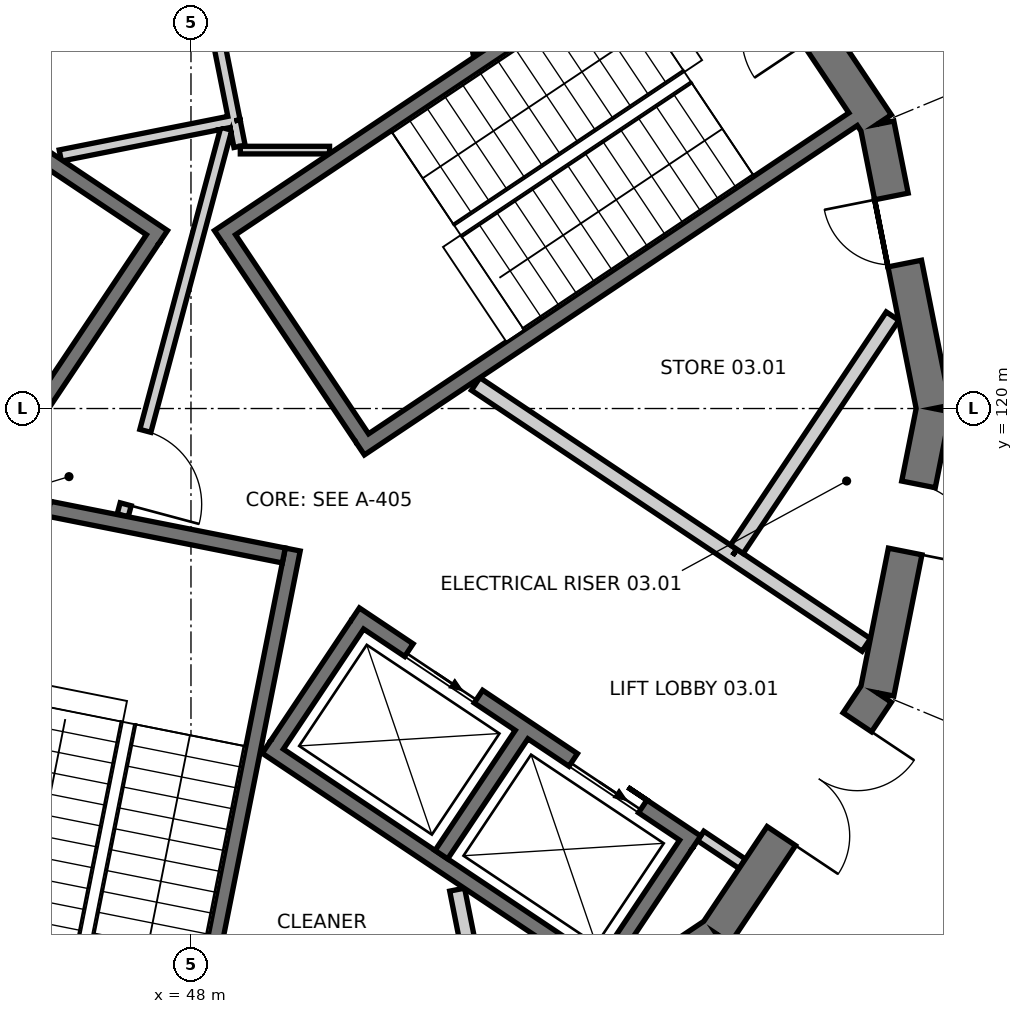
"""IFC4 building model, lengths in metres.
Left out: names, types, materials, properties, quantities, classifications, styles, units other than length and angle.
Written with IfcOpenShell. Run it as: python <this file> out.ifc"""

import sys

from ifc_helpers import new_model, si_unit, direction, frame, frame_2d, origin, place, context, subcontext, project, spatial, polyline, rectangle, outline, extrude, element, fill, save


model = new_model("IFC4")
c1 = context("Model", 3, precision=1e-05, world=origin(), true_north=direction((0.0, 1.0)))
c2 = subcontext(c1, "Body", "Model", "MODEL_VIEW")
j1 = project(units=[si_unit("LENGTHUNIT", "METRE"), si_unit("PLANEANGLEUNIT", "RADIAN")], contexts=[c1])
p1 = place(None, origin())
s1 = spatial("IfcSite", under=j1, at=p1, CompositionType="ELEMENT")
p2 = place(p1, origin())
s2 = spatial("IfcBuilding", under=s1, at=p2, CompositionType="ELEMENT")
p3 = place(p2, frame((0.0, 0.0, 15.6)))
s3 = spatial("IfcBuildingStorey", under=s2, at=p3, CompositionType="ELEMENT", Elevation=15.6)
p4 = place(p3, frame((57.771, 120.0, 0.0), z_axis=(0.0, 0.0, 1.0), x_axis=(-0.195069197673, 0.98078948206, 0.0)))
e1 = element("IfcWall", 1, at=p4, inside=s3, PredefinedType="SHEAR", context=c2, shape_type="SweptSolid", body=[
    extrude(outline(polyline([(-0.045, -0.225), (3.857, -0.225), (3.768, 0.225), (0.045, 0.225), (-0.045, -0.225)])), origin(), (0.0, 0.0, 1.0), 4.8),
])
p5 = place(p4, frame((1.945, 0.0, 0.0)))
e2 = element("IfcOpeningElement", 2, at=p5, cuts=e1, PredefinedType="OPENING", context=c2, shape_type="SweptSolid", body=[
    extrude(rectangle(XDim=0.9, YDim=2.1, at=frame_2d((0.45, 1.05))), frame((0.0, 0.235, 0.0), z_axis=(0.0, -1.0, 0.0), x_axis=(1.0, 0.0, 0.0)), (0.0, 0.0, 1.0), 0.47),
])
p6 = place(p3, frame((57.027, 123.739, 0.0), z_axis=(0.0, 0.0, 1.0), x_axis=(-0.555542277102, 0.83148829117, 0.0)))
e3 = element("IfcWall", 3, at=p6, inside=s3, PredefinedType="SHEAR", context=c2, shape_type="SweptSolid", body=[
    extrude(outline(polyline([(-0.045, -0.225), (3.857, -0.225), (3.768, 0.225), (0.045, 0.225), (-0.045, -0.225)])), origin(), (0.0, 0.0, 1.0), 4.8),
])
p7 = place(p6, frame((1.406, 0.0, 0.0)))
e4 = element("IfcOpeningElement", 4, at=p7, cuts=e3, PredefinedType="OPENING", context=c2, shape_type="SweptSolid", body=[
    extrude(rectangle(XDim=1.0, YDim=2.1, at=frame_2d((0.5, 1.05))), frame((0.0, 0.235, 0.0), z_axis=(0.0, -1.0, 0.0), x_axis=(1.0, 0.0, 0.0)), (0.0, 0.0, 1.0), 0.47),
])
p8 = place(p3, frame((51.739, 110.973, 0.0), z_axis=(0.0, 0.0, 1.0), x_axis=(0.83148829117, 0.555542277102, 0.0)))
e5 = element("IfcWall", 5, at=p8, inside=s3, PredefinedType="SHEAR", context=c2, shape_type="SweptSolid", body=[
    extrude(outline(polyline([(-0.045, -0.225), (3.857, -0.225), (3.768, 0.225), (0.045, 0.225), (-0.045, -0.225)])), origin(), (0.0, 0.0, 1.0), 4.8),
])
p9 = place(p3, frame((54.909, 113.091, 0.0), z_axis=(0.0, 0.0, 1.0), x_axis=(0.555542277102, 0.83148829117, 0.0)))
e6 = element("IfcWall", 6, at=p9, inside=s3, PredefinedType="SHEAR", context=c2, shape_type="SweptSolid", body=[
    extrude(outline(polyline([(-0.045, -0.225), (3.857, -0.225), (3.768, 0.225), (0.045, 0.225), (-0.045, -0.225)])), origin(), (0.0, 0.0, 1.0), 4.8),
])
p10 = place(p9, frame((1.545, 0.0, 0.0)))
e7 = element("IfcOpeningElement", 7, at=p10, cuts=e6, PredefinedType="OPENING", context=c2, shape_type="SweptSolid", body=[
    extrude(rectangle(XDim=1.8, YDim=2.1, at=frame_2d((0.9, 1.05))), frame((0.0, 0.235, 0.0), z_axis=(0.0, -1.0, 0.0), x_axis=(1.0, 0.0, 0.0)), (0.0, 0.0, 1.0), 0.47),
])
p11 = place(p3, frame((57.027, 116.261, 0.0), z_axis=(0.0, 0.0, 1.0), x_axis=(0.195069197673, 0.98078948206, 0.0)))
e8 = element("IfcWall", 8, at=p11, inside=s3, PredefinedType="SHEAR", context=c2, shape_type="SweptSolid", body=[
    extrude(outline(polyline([(-0.045, -0.225), (3.857, -0.225), (3.768, 0.225), (0.045, 0.225), (-0.045, -0.225)])), origin(), (0.0, 0.0, 1.0), 4.8),
])
p12 = place(p11, frame((1.895, 0.0, 0.0)))
e9 = element("IfcOpeningElement", 9, at=p12, cuts=e8, PredefinedType="OPENING", context=c2, shape_type="SweptSolid", body=[
    extrude(rectangle(XDim=0.9, YDim=2.1, at=frame_2d((0.45, 1.05))), frame((0.0, 0.235, 0.0), z_axis=(0.0, -1.0, 0.0), x_axis=(1.0, 0.0, 0.0)), (0.0, 0.0, 1.0), 0.47),
])
p13 = place(p3, frame((48.365, 122.258, 0.0), z_axis=(0.0, 0.0, 1.0), x_axis=(0.831476803301, 0.555559470779, 0.0)))
e10 = element("IfcWall", 10, at=p13, inside=s3, PredefinedType="SHEAR", context=c2, shape_type="SweptSolid", body=[
    extrude(rectangle(XDim=7.8, YDim=0.2, at=frame_2d((3.9, 0.0))), origin(), (0.0, 0.0, 1.0), 4.8),
])
p14 = place(p3, frame((50.226, 119.473, 0.0), z_axis=(0.0, 0.0, 1.0), x_axis=(0.831486463828, 0.555545012102, 0.0)))
e11 = element("IfcWall", 11, at=p14, inside=s3, PredefinedType="SHEAR", context=c2, shape_type="SweptSolid", body=[
    extrude(rectangle(XDim=7.8, YDim=0.2, at=frame_2d((3.9, 0.0))), origin(), (0.0, 0.0, 1.0), 4.8),
])
p15 = place(p3, frame((50.253, 119.612, 0.0), z_axis=(0.0, 0.0, 1.0), x_axis=(-0.55555842186, 0.831477504146, 0.0)))
e12 = element("IfcWall", 12, at=p15, inside=s3, PredefinedType="SHEAR", context=c2, shape_type="SweptSolid", body=[
    extrude(rectangle(XDim=3.15, YDim=0.2, at=frame_2d((1.575, 0.0))), origin(), (0.0, 0.0, 1.0), 4.8),
])
p16 = place(p3, frame((47.635, 122.258, 0.0), z_axis=(0.0, 0.0, 1.0), x_axis=(-0.831476803301, 0.555559470779, 0.0)))
e13 = element("IfcWall", 13, at=p16, inside=s3, PredefinedType="SHEAR", context=c2, shape_type="SweptSolid", body=[
    extrude(rectangle(XDim=7.8, YDim=0.2, at=frame_2d((3.9, 0.0))), origin(), (0.0, 0.0, 1.0), 4.8),
])
p17 = place(p3, frame((47.497, 122.231, 0.0), z_axis=(0.0, 0.0, 1.0), x_axis=(-0.55555842186, -0.831477504146, 0.0)))
e14 = element("IfcWall", 14, at=p17, inside=s3, PredefinedType="SHEAR", context=c2, shape_type="SweptSolid", body=[
    extrude(rectangle(XDim=3.15, YDim=0.2, at=frame_2d((1.575, 0.0))), origin(), (0.0, 0.0, 1.0), 4.8),
])
p18 = place(p3, frame((49.339, 118.145, 0.0), z_axis=(0.0, 0.0, 1.0), x_axis=(-0.195092759861, -0.980784795483, 0.0)))
e15 = element("IfcWall", 15, at=p18, inside=s3, PredefinedType="SHEAR", context=c2, shape_type="SweptSolid", body=[
    extrude(rectangle(XDim=7.8, YDim=0.2, at=frame_2d((3.9, 0.0))), origin(), (0.0, 0.0, 1.0), 4.8),
])
p19 = place(p3, frame((46.132, 118.681, 0.0), z_axis=(0.0, 0.0, 1.0), x_axis=(0.980785830564, -0.195087556151, 0.0)))
e16 = element("IfcWall", 16, at=p19, inside=s3, PredefinedType="SHEAR", context=c2, shape_type="SweptSolid", body=[
    extrude(rectangle(XDim=3.15, YDim=0.2, at=frame_2d((1.575, 0.0))), origin(), (0.0, 0.0, 1.0), 4.8),
])
p20 = place(p3, frame((50.16, 117.293, 0.0), z_axis=(0.0, 0.0, 1.0), x_axis=(0.831479497601, -0.55555543834, 0.0)))
e17 = element("IfcWall", 17, at=p20, inside=s3, PredefinedType="SHEAR", context=c2, shape_type="SweptSolid", body=[
    extrude(rectangle(XDim=5.4, YDim=0.2, at=frame_2d((2.7, 0.0))), origin(), (0.0, 0.0, 1.0), 4.8),
])
p21 = place(p20, frame((0.85, 0.0, 0.0)))
e18 = element("IfcOpeningElement", 18, at=p21, cuts=e17, PredefinedType="OPENING", context=c2, shape_type="SweptSolid", body=[
    extrude(rectangle(XDim=1.1, YDim=2.1, at=frame_2d((0.55, 1.05))), frame((0.0, 0.11, 0.0), z_axis=(0.0, -1.0, 0.0), x_axis=(1.0, 0.0, 0.0)), (0.0, 0.0, 1.0), 0.22),
])
p22 = place(p20, frame((3.45, 0.0, 0.0)))
e19 = element("IfcOpeningElement", 19, at=p22, cuts=e17, PredefinedType="OPENING", context=c2, shape_type="SweptSolid", body=[
    extrude(rectangle(XDim=1.1, YDim=2.1, at=frame_2d((0.55, 1.05))), frame((0.0, 0.11, 0.0), z_axis=(0.0, -1.0, 0.0), x_axis=(1.0, 0.0, 0.0)), (0.0, 0.0, 1.0), 0.22),
])
p23 = place(p3, frame((48.994, 115.548, 0.0), z_axis=(0.0, 0.0, 1.0), x_axis=(0.831444656906, -0.555607579593, 0.0)))
e20 = element("IfcWall", 20, at=p23, inside=s3, PredefinedType="SHEAR", context=c2, shape_type="SweptSolid", body=[
    extrude(rectangle(XDim=5.4, YDim=0.2, at=frame_2d((2.7, 0.0))), origin(), (0.0, 0.0, 1.0), 4.8),
])
p24 = place(p3, frame((50.188, 117.155, 0.0), z_axis=(0.0, 0.0, 1.0), x_axis=(-0.555559945722, -0.831476485963, 0.0)))
e21 = element("IfcWall", 21, at=p24, inside=s3, PredefinedType="SHEAR", context=c2, shape_type="SweptSolid", body=[
    extrude(rectangle(XDim=1.9, YDim=0.2, at=frame_2d((0.95, 0.0))), origin(), (0.0, 0.0, 1.0), 4.8),
])
p25 = place(p3, frame((52.35, 115.71, 0.0), z_axis=(0.0, 0.0, 1.0), x_axis=(-0.55550058618, -0.831516144614, 0.0)))
e22 = element("IfcWall", 22, at=p25, inside=s3, PredefinedType="SHEAR", context=c2, shape_type="SweptSolid", body=[
    extrude(rectangle(XDim=1.9, YDim=0.2, at=frame_2d((0.95, 0.0))), origin(), (0.0, 0.0, 1.0), 4.8),
])
p26 = place(p3, frame((54.512, 114.266, 0.0), z_axis=(0.0, 0.0, 1.0), x_axis=(-0.555589423235, -0.83145678949, 0.0)))
e23 = element("IfcWall", 23, at=p26, inside=s3, PredefinedType="SHEAR", context=c2, shape_type="SweptSolid", body=[
    extrude(rectangle(XDim=1.9, YDim=0.2, at=frame_2d((0.95, 0.0))), origin(), (0.0, 0.0, 1.0), 4.8),
])
p27 = place(p3, frame((55.126, 118.065, 0.0), z_axis=(0.0, 0.0, 1.0), x_axis=(-0.831495502265, 0.555531483998, 0.0)))
e24 = element("IfcWall", 24, at=p27, inside=s3, PredefinedType="SOLIDWALL", context=c2, shape_type="SweptSolid", body=[
    extrude(rectangle(XDim=4.065, YDim=0.2, at=frame_2d((2.033, 0.0))), origin(), (0.0, 0.0, 1.0), 4.52),
])
p28 = place(p3, frame((57.231, 121.215, 0.0), z_axis=(0.0, 0.0, 1.0), x_axis=(-0.555600969312, -0.831449074147, 0.0)))
e25 = element("IfcWall", 25, at=p28, inside=s3, PredefinedType="SOLIDWALL", context=c2, shape_type="SweptSolid", body=[
    extrude(rectangle(XDim=3.689, YDim=0.2, at=frame_2d((1.844, 0.0))), origin(), (0.0, 0.0, 1.0), 4.52),
])
p29 = place(p3, frame((56.885, 116.89, 0.0), z_axis=(0.0, 0.0, 1.0), x_axis=(-0.831446094913, 0.555605427667, 0.0)))
e26 = element("IfcWall", 26, at=p29, inside=s3, PredefinedType="SOLIDWALL", context=c2, shape_type="SweptSolid", body=[
    extrude(rectangle(XDim=2.115, YDim=0.2, at=frame_2d((1.058, 0.0))), origin(), (0.0, 0.0, 1.0), 4.52),
])
p30 = place(p3, frame((48.056, 126.384, 0.0), z_axis=(0.0, 0.0, 1.0), x_axis=(0.195123903338, -0.980778600065, 0.0)))
e27 = element("IfcWall", 27, at=p30, inside=s3, PredefinedType="PARTITIONING", context=c2, shape_type="SweptSolid", body=[
    extrude(rectangle(XDim=2.65, YDim=0.15, at=frame_2d((1.325, 0.0))), origin(), (0.0, 0.0, 1.0), 4.52),
])
p31 = place(p3, frame((48.524, 123.775, 0.0), z_axis=(0.0, 0.0, 1.0), x_axis=(-0.980777249161, -0.195130693455, 0.0)))
e28 = element("IfcWall", 28, at=p31, inside=s3, PredefinedType="PARTITIONING", context=c2, shape_type="SweptSolid", body=[
    extrude(rectangle(XDim=2.287, YDim=0.15, at=frame_2d((1.144, 0.0))), origin(), (0.0, 0.0, 1.0), 4.52),
])
p32 = place(p3, frame((50.911, 128.943, 0.0), z_axis=(0.0, 0.0, 1.0), x_axis=(0.195113868301, -0.980780596462, 0.0)))
e29 = element("IfcWall", 29, at=p32, inside=s3, PredefinedType="PARTITIONING", context=c2, shape_type="SweptSolid", body=[
    extrude(rectangle(XDim=4.357, YDim=0.1, at=frame_2d((2.178, 0.0))), origin(), (0.0, 0.0, 1.0), 4.52),
])
p33 = place(p3, frame((49.823, 123.4, 0.0), z_axis=(0.0, 0.0, 1.0), x_axis=(-1.0, 0.0, 0.0)))
e30 = element("IfcWall", 30, at=p33, inside=s3, PredefinedType="PARTITIONING", context=c2, shape_type="SweptSolid", body=[
    extrude(rectangle(XDim=1.174, YDim=0.1, at=frame_2d((0.587, 0.0))), origin(), (0.0, 0.0, 1.0), 4.52),
])
p34 = place(p3, frame((48.639, 123.449, 0.0), z_axis=(0.0, 0.0, 1.0), x_axis=(-0.194880473507, 0.98082699853, 0.0)))
e31 = element("IfcWall", 31, at=p34, inside=s3, PredefinedType="PARTITIONING", context=c2, shape_type="SweptSolid", body=[
    extrude(rectangle(XDim=0.342, YDim=0.15, at=frame_2d((0.171, 0.0))), origin(), (0.0, 0.0, 1.0), 4.52),
])
p35 = place(p3, frame((51.502, 113.67, 0.0), z_axis=(0.0, 0.0, 1.0), x_axis=(0.19508928515, -0.980785486648, 0.0)))
e32 = element("IfcWall", 32, at=p35, inside=s3, PredefinedType="SOLIDWALL", context=c2, shape_type="SweptSolid", body=[
    extrude(rectangle(XDim=2.286, YDim=0.2, at=frame_2d((1.143, 0.0))), origin(), (0.0, 0.0, 1.0), 4.52),
])
p36 = place(p3, frame((54.706, 114.377, 0.0), z_axis=(0.0, 0.0, 1.0), x_axis=(0.831421626399, -0.555642042286, 0.0)))
e33 = element("IfcWall", 33, at=p36, inside=s3, PredefinedType="PARTITIONING", context=c2, shape_type="SweptSolid", body=[
    extrude(rectangle(XDim=0.658, YDim=0.15, at=frame_2d((0.329, 0.0))), origin(), (0.0, 0.0, 1.0), 4.52),
])
p37 = place(p3, frame((47.102, 118.595, 0.0), z_axis=(0.0, 0.0, 1.0), x_axis=(0.258814124304, 0.9659271448, 0.0)))
e34 = element("IfcWall", 34, at=p37, inside=s3, PredefinedType="PARTITIONING", context=c2, shape_type="SweptSolid", body=[
    extrude(rectangle(XDim=5.265, YDim=0.15, at=frame_2d((2.632, 0.0))), origin(), (0.0, 0.0, 1.0), 4.52),
])
p38 = place(p37, frame((0.15, 0.0, 0.0)))
e35 = element("IfcOpeningElement", 35, at=p38, cuts=e34, PredefinedType="OPENING", context=c2, shape_type="SweptSolid", body=[
    extrude(rectangle(XDim=1.0, YDim=2.1, at=frame_2d((0.5, 1.05))), frame((0.0, 0.085, 0.0), z_axis=(0.0, -1.0, 0.0), x_axis=(1.0, 0.0, 0.0)), (0.0, 0.0, 1.0), 0.17),
])
p39 = place(p3, frame((60.38, 114.872, 0.0), z_axis=(0.0, 0.0, 1.0), x_axis=(-0.555583506678, -0.831460742974, 0.0)))
e36 = element("IfcWall", 36, at=p39, inside=s3, PredefinedType="PARTITIONING", context=c2, shape_type="SweptSolid", body=[
    extrude(rectangle(XDim=5.228, YDim=0.15, at=frame_2d((2.614, 0.0))), origin(), (0.0, 0.0, 1.0), 4.52),
])
p40 = place(p39, frame((1.714, 0.0, 0.0)))
e37 = element("IfcOpeningElement", 37, at=p40, cuts=e36, PredefinedType="OPENING", context=c2, shape_type="SweptSolid", body=[
    extrude(rectangle(XDim=1.8, YDim=2.1, at=frame_2d((0.9, 1.05))), frame((0.0, 0.085, 0.0), z_axis=(0.0, -1.0, 0.0), x_axis=(1.0, 0.0, 0.0)), (0.0, 0.0, 1.0), 0.17),
])
p41 = place(p21, origin())
e38 = element("IfcDoor", 38, at=p41, inside=s3, OperationType="SLIDING_TO_LEFT", PredefinedType="DOOR", context=c2, shape_type="SweptSolid", body=[
    extrude(rectangle(XDim=1.1, YDim=2.1, at=frame_2d((0.55, 1.05))), frame((0.0, 0.025, 0.0), z_axis=(0.0, -1.0, 0.0), x_axis=(1.0, 0.0, 0.0)), (0.0, 0.0, 1.0), 0.05),
])
fill(e18, e38)
p42 = place(p22, origin())
e39 = element("IfcDoor", 39, at=p42, inside=s3, OperationType="SLIDING_TO_LEFT", PredefinedType="DOOR", context=c2, shape_type="SweptSolid", body=[
    extrude(rectangle(XDim=1.1, YDim=2.1, at=frame_2d((0.55, 1.05))), frame((0.0, 0.025, 0.0), z_axis=(0.0, -1.0, 0.0), x_axis=(1.0, 0.0, 0.0)), (0.0, 0.0, 1.0), 0.05),
])
fill(e19, e39)
p43 = place(p5, origin())
e40 = element("IfcDoor", 40, at=p43, inside=s3, OperationType="SINGLE_SWING_RIGHT", PredefinedType="DOOR", context=c2, shape_type="SweptSolid", body=[
    extrude(rectangle(XDim=0.9, YDim=2.1, at=frame_2d((0.45, 1.05))), frame((0.0, 0.025, 0.0), z_axis=(0.0, -1.0, 0.0), x_axis=(1.0, 0.0, 0.0)), (0.0, 0.0, 1.0), 0.05),
])
fill(e2, e40)
p44 = place(p12, frame((0.9, 0.0, 0.0), z_axis=(0.0, 0.0, 1.0), x_axis=(-1.0, 0.0, 0.0)))
e41 = element("IfcDoor", 41, at=p44, inside=s3, OperationType="SINGLE_SWING_RIGHT", PredefinedType="DOOR", context=c2, shape_type="SweptSolid", body=[
    extrude(rectangle(XDim=0.9, YDim=2.1, at=frame_2d((0.45, 1.05))), frame((0.0, 0.025, 0.0), z_axis=(0.0, -1.0, 0.0), x_axis=(1.0, 0.0, 0.0)), (0.0, 0.0, 1.0), 0.05),
])
fill(e9, e41)
p45 = place(p10, frame((1.8, 0.0, 0.0), z_axis=(0.0, 0.0, 1.0), x_axis=(-1.0, 0.0, 0.0)))
e42 = element("IfcDoor", 42, at=p45, inside=s3, OperationType="DOUBLE_DOOR_SINGLE_SWING", PredefinedType="DOOR", context=c2, shape_type="SweptSolid", body=[
    extrude(rectangle(XDim=1.8, YDim=2.1, at=frame_2d((0.9, 1.05))), frame((0.0, 0.025, 0.0), z_axis=(0.0, -1.0, 0.0), x_axis=(1.0, 0.0, 0.0)), (0.0, 0.0, 1.0), 0.05),
])
fill(e7, e42)
p46 = place(p38, frame((1.0, 0.0, 0.0), z_axis=(0.0, 0.0, 1.0), x_axis=(-1.0, 0.0, 0.0)))
e43 = element("IfcDoor", 43, at=p46, inside=s3, OperationType="SINGLE_SWING_RIGHT", PredefinedType="DOOR", context=c2, shape_type="SweptSolid", body=[
    extrude(rectangle(XDim=1.0, YDim=2.1, at=frame_2d((0.5, 1.05))), frame((0.0, 0.025, 0.0), z_axis=(0.0, -1.0, 0.0), x_axis=(1.0, 0.0, 0.0)), (0.0, 0.0, 1.0), 0.05),
])
fill(e35, e43)
save(model, sys.argv[1])
